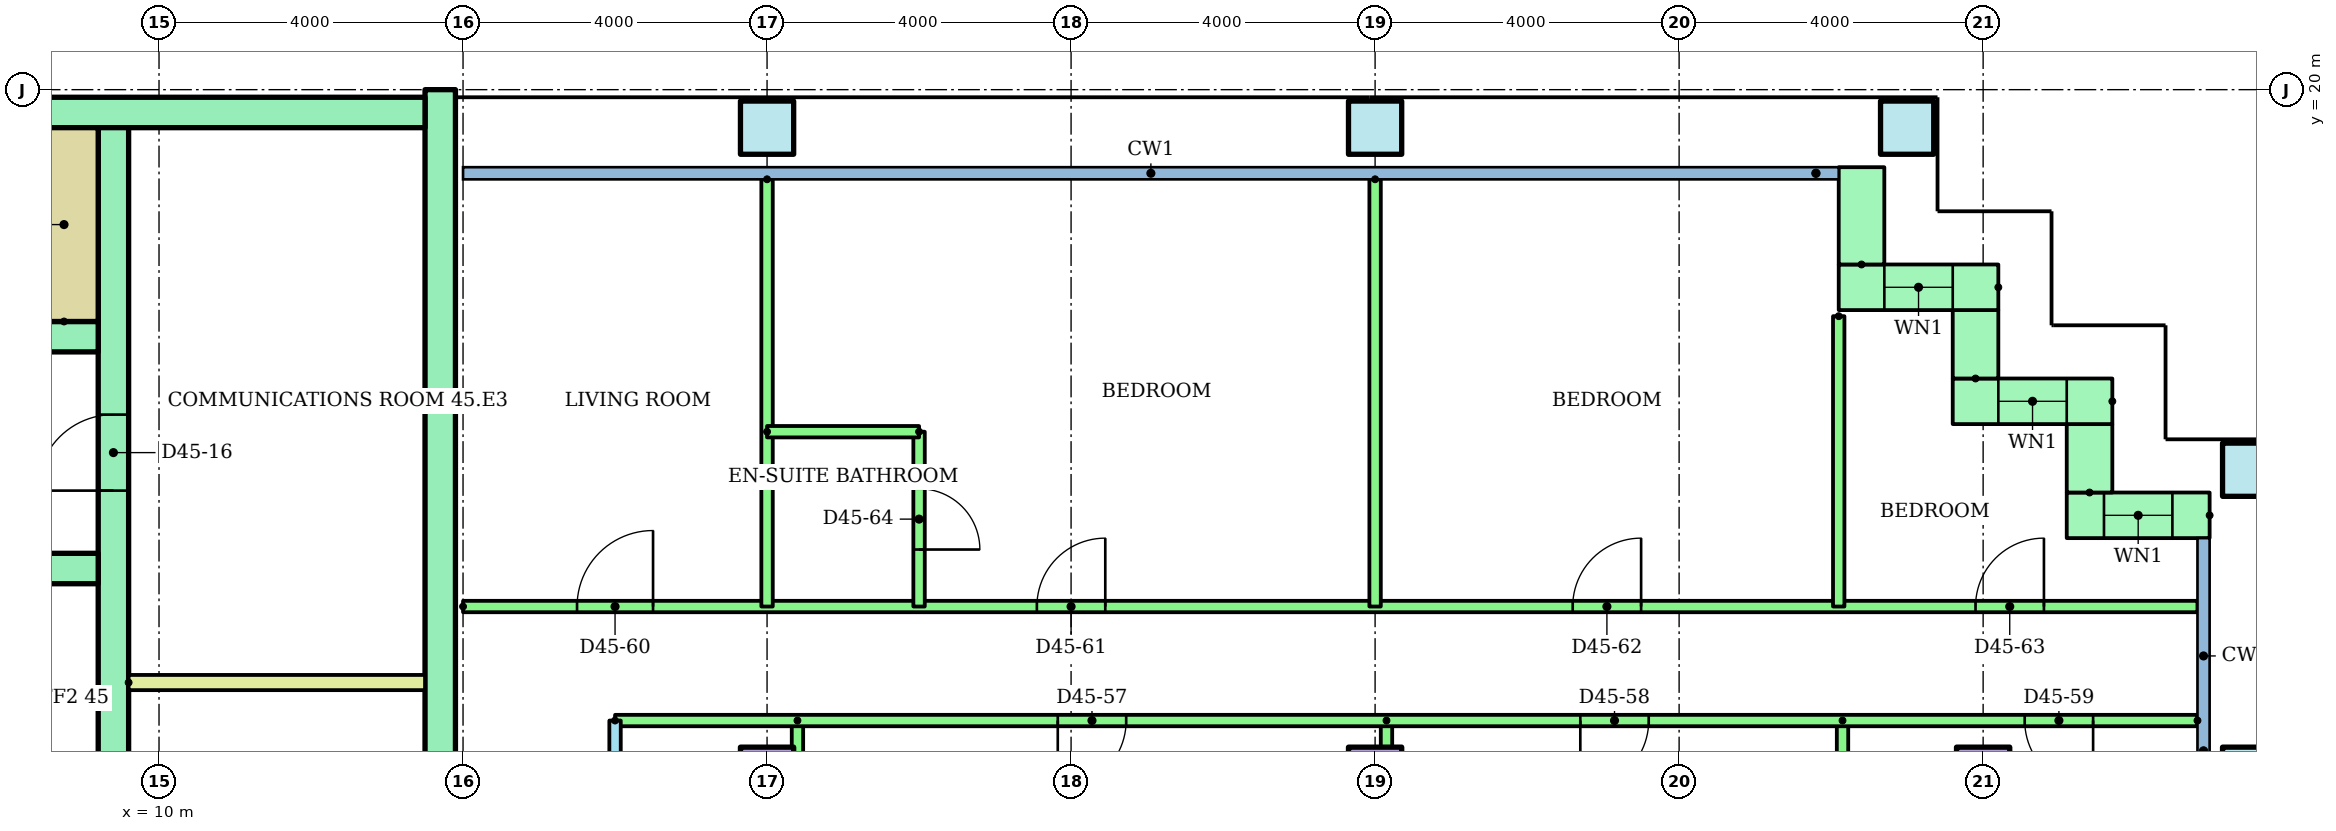
"""IFC4 building model, lengths in metres.
Left out: names, types, materials, properties, quantities, classifications, styles, units other than length and angle.
Written with IfcOpenShell. Run it as: python <this file> out.ifc"""

import sys

from ifc_helpers import new_model, si_unit, direction, frame, frame_2d, origin, origin_2d, place, context, subcontext, project, spatial, rectangle, hollow_rectangle, extrude, element, fill, save


model = new_model("IFC4")
c1 = context("Model", 3, precision=1e-05, world=origin(), true_north=direction((0.0, 1.0)))
c2 = subcontext(c1, "Body", "Model", "MODEL_VIEW")
j1 = project(units=[si_unit("LENGTHUNIT", "METRE"), si_unit("PLANEANGLEUNIT", "RADIAN")], contexts=[c1])
p1 = place(None, origin())
s1 = spatial("IfcSite", under=j1, at=p1, CompositionType="ELEMENT")
p2 = place(p1, origin())
s2 = spatial("IfcBuilding", under=s1, at=p2, CompositionType="ELEMENT")
p3 = place(p2, frame((0.0, 0.0, 174.9)))
s3 = spatial("IfcBuildingStorey", under=s2, at=p3, CompositionType="ELEMENT", Elevation=174.9)
for number, where in (
    (1, (18.0, 11.0, 0.0)),
    (2, (26.0, 11.0, 0.0)),
    (3, (34.0, 11.0, 0.0)),
):
    element("IfcColumn", number, at=place(p3, frame(where)), inside=s3, PredefinedType="COLUMN", context=c2, shape_type="SweptSolid", body=[
        extrude(rectangle(XDim=0.7, YDim=0.7, at=origin_2d()), origin(), (0.0, 0.0, 1.0), 3.2),
    ])
for number, where in (
    (4, (37.5, 11.0, 0.0)),
    (5, (37.5, 15.0, 0.0)),
    (6, (18.0, 19.5, 0.0)),
    (7, (26.0, 19.5, 0.0)),
    (8, (33.0, 19.5, 0.0)),
):
    element("IfcColumn", number, at=place(p3, frame(where)), inside=s3, PredefinedType="COLUMN", context=c2, shape_type="SweptSolid", body=[
        extrude(hollow_rectangle(XDim=0.7, YDim=0.7, WallThickness=0.036, at=origin_2d()), origin(), (0.0, 0.0, 1.0), 3.2),
    ])
p4 = place(p3, frame((36.98, 14.4, 0.0), z_axis=(0.0, 0.0, 1.0), x_axis=(-1.0, 0.0, 0.0)))
e9 = element("IfcWall", 9, at=p4, inside=s3, PredefinedType="STANDARD", context=c2, shape_type="SweptSolid", body=[
    extrude(rectangle(XDim=1.88, YDim=0.6, at=frame_2d((0.94, 0.0))), origin(), (0.0, 0.0, 1.0), 2.92),
])
p5 = place(p4, frame((0.49, 0.0, 0.9)))
e10 = element("IfcOpeningElement", 10, at=p5, cuts=e9, PredefinedType="OPENING", context=c2, shape_type="SweptSolid", body=[
    extrude(rectangle(XDim=0.9, YDim=1.5, at=frame_2d((0.45, 0.75))), frame((0.0, 0.31, 0.0), z_axis=(0.0, -1.0, 0.0), x_axis=(1.0, 0.0, 0.0)), (0.0, 0.0, 1.0), 0.62),
])
p6 = place(p3, frame((35.4, 14.7, 0.0), z_axis=(0.0, 0.0, 1.0), x_axis=(0.0, 1.0, 0.0)))
e11 = element("IfcWall", 11, at=p6, inside=s3, PredefinedType="STANDARD", context=c2, shape_type="SweptSolid", body=[
    extrude(rectangle(XDim=0.9, YDim=0.6, at=frame_2d((0.45, 0.0))), origin(), (0.0, 0.0, 1.0), 2.92),
])
p7 = place(p3, frame((35.7, 15.9, 0.0), z_axis=(0.0, 0.0, 1.0), x_axis=(-1.0, 0.0, 0.0)))
e12 = element("IfcWall", 12, at=p7, inside=s3, PredefinedType="STANDARD", context=c2, shape_type="SweptSolid", body=[
    extrude(rectangle(XDim=2.1, YDim=0.6, at=frame_2d((1.05, 0.0))), origin(), (0.0, 0.0, 1.0), 2.92),
])
p8 = place(p7, frame((0.6, 0.0, 0.9)))
e13 = element("IfcOpeningElement", 13, at=p8, cuts=e12, PredefinedType="OPENING", context=c2, shape_type="SweptSolid", body=[
    extrude(rectangle(XDim=0.9, YDim=1.5, at=frame_2d((0.45, 0.75))), frame((0.0, 0.31, 0.0), z_axis=(0.0, -1.0, 0.0), x_axis=(1.0, 0.0, 0.0)), (0.0, 0.0, 1.0), 0.62),
])
p9 = place(p3, frame((33.9, 16.2, 0.0), z_axis=(0.0, 0.0, 1.0), x_axis=(0.0, 1.0, 0.0)))
e14 = element("IfcWall", 14, at=p9, inside=s3, PredefinedType="STANDARD", context=c2, shape_type="SweptSolid", body=[
    extrude(rectangle(XDim=0.9, YDim=0.6, at=frame_2d((0.45, 0.0))), origin(), (0.0, 0.0, 1.0), 2.92),
])
p10 = place(p3, frame((34.2, 17.4, 0.0), z_axis=(0.0, 0.0, 1.0), x_axis=(-1.0, 0.0, 0.0)))
e15 = element("IfcWall", 15, at=p10, inside=s3, PredefinedType="STANDARD", context=c2, shape_type="SweptSolid", body=[
    extrude(rectangle(XDim=2.1, YDim=0.6, at=frame_2d((1.05, 0.0))), origin(), (0.0, 0.0, 1.0), 2.92),
])
p11 = place(p10, frame((0.6, 0.0, 0.9)))
e16 = element("IfcOpeningElement", 16, at=p11, cuts=e15, PredefinedType="OPENING", context=c2, shape_type="SweptSolid", body=[
    extrude(rectangle(XDim=0.9, YDim=1.5, at=frame_2d((0.45, 0.75))), frame((0.0, 0.31, 0.0), z_axis=(0.0, -1.0, 0.0), x_axis=(1.0, 0.0, 0.0)), (0.0, 0.0, 1.0), 0.62),
])
p12 = place(p3, frame((32.4, 17.7, 0.0), z_axis=(0.0, 0.0, 1.0), x_axis=(0.0, 1.0, 0.0)))
e17 = element("IfcWall", 17, at=p12, inside=s3, PredefinedType="STANDARD", context=c2, shape_type="SweptSolid", body=[
    extrude(rectangle(XDim=1.28, YDim=0.6, at=frame_2d((0.64, 0.0))), origin(), (0.0, 0.0, 1.0), 2.92),
])
p13 = place(p3, frame((13.7, 3.0, 0.0), z_axis=(0.0, 0.0, 1.0), x_axis=(0.0, 1.0, 0.0)))
e18 = element("IfcWall", 18, at=p13, inside=s3, PredefinedType="SHEAR", context=c2, shape_type="SweptSolid", body=[
    extrude(rectangle(XDim=17.0, YDim=0.4, at=frame_2d((8.5, 0.0))), origin(), (0.0, 0.0, 1.0), 2.92),
])
p14 = place(p3, frame((-13.5, 19.7, 0.0)))
e19 = element("IfcWall", 19, at=p14, inside=s3, PredefinedType="SHEAR", context=c2, shape_type="SweptSolid", body=[
    extrude(rectangle(XDim=27.0, YDim=0.4, at=frame_2d((13.5, 0.0))), origin(), (0.0, 0.0, 1.0), 2.92),
])
p15 = place(p3, frame((9.4, 6.8, 0.0), z_axis=(0.0, 0.0, 1.0), x_axis=(0.0, 1.0, 0.0)))
e20 = element("IfcWall", 20, at=p15, inside=s3, PredefinedType="SHEAR", context=c2, shape_type="SweptSolid", body=[
    extrude(rectangle(XDim=12.7, YDim=0.4, at=frame_2d((6.35, 0.0))), origin(), (0.0, 0.0, 1.0), 2.92),
])
p16 = place(p15, frame((0.3, 0.0, 0.0)))
e21 = element("IfcOpeningElement", 21, at=p16, cuts=e20, PredefinedType="OPENING", context=c2, shape_type="SweptSolid", body=[
    extrude(rectangle(XDim=1.0, YDim=2.1, at=frame_2d((0.5, 1.05))), frame((0.0, 0.21, 0.0), z_axis=(0.0, -1.0, 0.0), x_axis=(1.0, 0.0, 0.0)), (0.0, 0.0, 1.0), 0.42),
])
p17 = place(p15, frame((2.05, 0.0, 0.0)))
e22 = element("IfcOpeningElement", 22, at=p17, cuts=e20, PredefinedType="OPENING", context=c2, shape_type="SweptSolid", body=[
    extrude(rectangle(XDim=1.0, YDim=2.1, at=frame_2d((0.5, 1.05))), frame((0.0, 0.21, 0.0), z_axis=(0.0, -1.0, 0.0), x_axis=(1.0, 0.0, 0.0)), (0.0, 0.0, 1.0), 0.42),
])
p18 = place(p15, frame((7.925, 0.0, 0.0)))
e23 = element("IfcOpeningElement", 23, at=p18, cuts=e20, PredefinedType="OPENING", context=c2, shape_type="SweptSolid", body=[
    extrude(rectangle(XDim=1.0, YDim=2.1, at=frame_2d((0.5, 1.05))), frame((0.0, 0.21, 0.0), z_axis=(0.0, -1.0, 0.0), x_axis=(1.0, 0.0, 0.0)), (0.0, 0.0, 1.0), 0.42),
])
p19 = place(p3, frame((1.2, 13.7, 0.0)))
e24 = element("IfcWall", 24, at=p19, inside=s3, PredefinedType="SHEAR", context=c2, shape_type="SweptSolid", body=[
    extrude(rectangle(XDim=8.0, YDim=0.4, at=frame_2d((4.0, 0.0))), origin(), (0.0, 0.0, 1.0), 2.92),
])
p20 = place(p3, frame((-9.2, 16.75, 0.0)))
e25 = element("IfcWall", 25, at=p20, inside=s3, PredefinedType="SHEAR", context=c2, shape_type="SweptSolid", body=[
    extrude(rectangle(XDim=18.4, YDim=0.4, at=frame_2d((9.2, 0.0))), origin(), (0.0, 0.0, 1.0), 2.92),
])
p21 = place(p20, frame((0.1, 0.0, 0.0)))
e26 = element("IfcOpeningElement", 26, at=p21, cuts=e25, PredefinedType="OPENING", context=c2, shape_type="SweptSolid", body=[
    extrude(rectangle(XDim=0.95, YDim=2.1, at=frame_2d((0.475, 1.05))), frame((0.0, 0.21, 0.0), z_axis=(0.0, -1.0, 0.0), x_axis=(1.0, 0.0, 0.0)), (0.0, 0.0, 1.0), 0.42),
])
p22 = place(p20, frame((6.1, 0.0, 0.0)))
e27 = element("IfcOpeningElement", 27, at=p22, cuts=e25, PredefinedType="OPENING", context=c2, shape_type="SweptSolid", body=[
    extrude(rectangle(XDim=0.95, YDim=2.1, at=frame_2d((0.475, 1.05))), frame((0.0, 0.21, 0.0), z_axis=(0.0, -1.0, 0.0), x_axis=(1.0, 0.0, 0.0)), (0.0, 0.0, 1.0), 0.42),
])
p23 = place(p20, frame((12.1, 0.0, 0.0)))
e28 = element("IfcOpeningElement", 28, at=p23, cuts=e25, PredefinedType="OPENING", context=c2, shape_type="SweptSolid", body=[
    extrude(rectangle(XDim=0.95, YDim=2.1, at=frame_2d((0.475, 1.05))), frame((0.0, 0.21, 0.0), z_axis=(0.0, -1.0, 0.0), x_axis=(1.0, 0.0, 0.0)), (0.0, 0.0, 1.0), 0.42),
])
p24 = place(p3, frame((8.75, 16.95, 0.0), z_axis=(0.0, 0.0, 1.0), x_axis=(0.0, 1.0, 0.0)))
e29 = element("IfcWall", 29, at=p24, inside=s3, PredefinedType="SHEAR", context=c2, shape_type="SweptSolid", body=[
    extrude(rectangle(XDim=2.55, YDim=0.9, at=frame_2d((1.275, 0.0))), origin(), (0.0, 0.0, 1.0), 2.92),
])
p25 = place(p3, frame((9.6, 12.2, 0.0)))
e30 = element("IfcWall", 30, at=p25, inside=s3, PredefinedType="PARTITIONING", context=c2, shape_type="SweptSolid", body=[
    extrude(rectangle(XDim=3.9, YDim=0.2, at=frame_2d((1.95, 0.0))), origin(), (0.0, 0.0, 1.0), 2.92),
])
p26 = place(p3, frame((16.0, 11.7, 0.0), z_axis=(0.0, 0.0, 1.0), x_axis=(0.0, -1.0, 0.0)))
e31 = element("IfcWall", 31, at=p26, inside=s3, PredefinedType="PARTITIONING", context=c2, shape_type="SweptSolid", body=[
    extrude(rectangle(XDim=10.3, YDim=0.15, at=frame_2d((5.15, 0.0))), origin(), (0.0, 0.0, 1.0), 2.4),
])
p27 = place(p26, frame((6.975, 0.0, 0.0)))
e32 = element("IfcOpeningElement", 32, at=p27, cuts=e31, PredefinedType="OPENING", context=c2, shape_type="SweptSolid", body=[
    extrude(rectangle(XDim=0.9, YDim=2.1, at=frame_2d((0.45, 1.05))), frame((0.0, 0.085, 0.0), z_axis=(0.0, -1.0, 0.0), x_axis=(1.0, 0.0, 0.0)), (0.0, 0.0, 1.0), 0.17),
])
p28 = place(p26, frame((1.875, 0.0, 0.0)))
e33 = element("IfcOpeningElement", 33, at=p28, cuts=e31, PredefinedType="OPENING", context=c2, shape_type="SweptSolid", body=[
    extrude(rectangle(XDim=0.8, YDim=2.1, at=frame_2d((0.4, 1.05))), frame((0.0, 0.085, 0.0), z_axis=(0.0, -1.0, 0.0), x_axis=(1.0, 0.0, 0.0)), (0.0, 0.0, 1.0), 0.17),
])
for number, where, z_axis, x_axis in (
    (34, (18.4, 11.7, 0.0), (0.0, 0.0, 1.0), (0.0, -1.0, 0.0)),
    (35, (26.15, 11.7, 0.0), (0.0, 0.0, 1.0), (0.0, -1.0, 0.0)),
    (36, (32.15, 11.7, 0.0), (0.0, 0.0, 1.0), (0.0, -1.0, 0.0)),
):
    element("IfcWall", number, at=place(p3, frame(where, z_axis=z_axis, x_axis=x_axis)), inside=s3, PredefinedType="PARTITIONING", context=c2, shape_type="SweptSolid", body=[
        extrude(rectangle(XDim=10.3, YDim=0.15, at=frame_2d((5.15, 0.0))), origin(), (0.0, 0.0, 1.0), 2.4),
    ])
p29 = place(p3, frame((36.82, 11.7, 0.0), z_axis=(0.0, 0.0, 1.0), x_axis=(-1.0, 0.0, 0.0)))
e37 = element("IfcWall", 37, at=p29, inside=s3, PredefinedType="PARTITIONING", context=c2, shape_type="SweptSolid", body=[
    extrude(rectangle(XDim=20.82, YDim=0.15, at=frame_2d((10.41, 0.0))), origin(), (0.0, 0.0, 1.0), 2.4),
])
p30 = place(p29, frame((14.095, 0.0, 0.0)))
e38 = element("IfcOpeningElement", 38, at=p30, cuts=e37, PredefinedType="OPENING", context=c2, shape_type="SweptSolid", body=[
    extrude(rectangle(XDim=0.9, YDim=2.1, at=frame_2d((0.45, 1.05))), frame((0.0, 0.085, 0.0), z_axis=(0.0, -1.0, 0.0), x_axis=(1.0, 0.0, 0.0)), (0.0, 0.0, 1.0), 0.17),
])
p31 = place(p29, frame((7.22, 0.0, 0.0)))
e39 = element("IfcOpeningElement", 39, at=p31, cuts=e37, PredefinedType="OPENING", context=c2, shape_type="SweptSolid", body=[
    extrude(rectangle(XDim=0.9, YDim=2.1, at=frame_2d((0.45, 1.05))), frame((0.0, 0.085, 0.0), z_axis=(0.0, -1.0, 0.0), x_axis=(1.0, 0.0, 0.0)), (0.0, 0.0, 1.0), 0.17),
])
p32 = place(p29, frame((1.373, 0.0, 0.0)))
e40 = element("IfcOpeningElement", 40, at=p32, cuts=e37, PredefinedType="OPENING", context=c2, shape_type="SweptSolid", body=[
    extrude(rectangle(XDim=0.9, YDim=2.1, at=frame_2d((0.45, 1.05))), frame((0.0, 0.085, 0.0), z_axis=(0.0, -1.0, 0.0), x_axis=(1.0, 0.0, 0.0)), (0.0, 0.0, 1.0), 0.17),
])
p33 = place(p3, frame((14.0, 13.2, 0.0)))
e41 = element("IfcWall", 41, at=p33, inside=s3, PredefinedType="PARTITIONING", context=c2, shape_type="SweptSolid", body=[
    extrude(rectangle(XDim=22.82, YDim=0.15, at=frame_2d((11.41, 0.0))), origin(), (0.0, 0.0, 1.0), 2.4),
])
p34 = place(p33, frame((1.5, 0.0, 0.0)))
e42 = element("IfcOpeningElement", 42, at=p34, cuts=e41, PredefinedType="OPENING", context=c2, shape_type="SweptSolid", body=[
    extrude(rectangle(XDim=1.0, YDim=2.1, at=frame_2d((0.5, 1.05))), frame((0.0, 0.085, 0.0), z_axis=(0.0, -1.0, 0.0), x_axis=(1.0, 0.0, 0.0)), (0.0, 0.0, 1.0), 0.17),
])
p35 = place(p33, frame((7.55, 0.0, 0.0)))
e43 = element("IfcOpeningElement", 43, at=p35, cuts=e41, PredefinedType="OPENING", context=c2, shape_type="SweptSolid", body=[
    extrude(rectangle(XDim=0.9, YDim=2.1, at=frame_2d((0.45, 1.05))), frame((0.0, 0.085, 0.0), z_axis=(0.0, -1.0, 0.0), x_axis=(1.0, 0.0, 0.0)), (0.0, 0.0, 1.0), 0.17),
])
p36 = place(p33, frame((14.6, 0.0, 0.0)))
e44 = element("IfcOpeningElement", 44, at=p36, cuts=e41, PredefinedType="OPENING", context=c2, shape_type="SweptSolid", body=[
    extrude(rectangle(XDim=0.9, YDim=2.1, at=frame_2d((0.45, 1.05))), frame((0.0, 0.085, 0.0), z_axis=(0.0, -1.0, 0.0), x_axis=(1.0, 0.0, 0.0)), (0.0, 0.0, 1.0), 0.17),
])
p37 = place(p33, frame((19.9, 0.0, 0.0)))
e45 = element("IfcOpeningElement", 45, at=p37, cuts=e41, PredefinedType="OPENING", context=c2, shape_type="SweptSolid", body=[
    extrude(rectangle(XDim=0.9, YDim=2.1, at=frame_2d((0.45, 1.05))), frame((0.0, 0.085, 0.0), z_axis=(0.0, -1.0, 0.0), x_axis=(1.0, 0.0, 0.0)), (0.0, 0.0, 1.0), 0.17),
])
for number, where, z_axis, x_axis in (
    (46, (18.0, 18.821, 0.0), (0.0, 0.0, 1.0), (0.0, -1.0, 0.0)),
    (47, (26.0, 18.821, 0.0), (0.0, 0.0, 1.0), (0.0, -1.0, 0.0)),
):
    element("IfcWall", number, at=place(p3, frame(where, z_axis=z_axis, x_axis=x_axis)), inside=s3, PredefinedType="PARTITIONING", context=c2, shape_type="SweptSolid", body=[
        extrude(rectangle(XDim=5.621, YDim=0.15, at=frame_2d((2.811, 0.0))), origin(), (0.0, 0.0, 1.0), 2.4),
    ])
p38 = place(p3, frame((32.1, 17.02, 0.0), z_axis=(0.0, 0.0, 1.0), x_axis=(0.0, -1.0, 0.0)))
e48 = element("IfcWall", 48, at=p38, inside=s3, PredefinedType="PARTITIONING", context=c2, shape_type="SweptSolid", body=[
    extrude(rectangle(XDim=3.82, YDim=0.15, at=frame_2d((1.91, 0.0))), origin(), (0.0, 0.0, 1.0), 2.4),
])
p39 = place(p3, frame((20.0, 15.5, 0.0), z_axis=(0.0, 0.0, 1.0), x_axis=(0.0, -1.0, 0.0)))
e49 = element("IfcWall", 49, at=p39, inside=s3, PredefinedType="PARTITIONING", context=c2, shape_type="SweptSolid", body=[
    extrude(rectangle(XDim=2.3, YDim=0.15, at=frame_2d((1.15, 0.0))), origin(), (0.0, 0.0, 1.0), 2.4),
])
p40 = place(p39, frame((0.75, 0.0, 0.0)))
e50 = element("IfcOpeningElement", 50, at=p40, cuts=e49, PredefinedType="OPENING", context=c2, shape_type="SweptSolid", body=[
    extrude(rectangle(XDim=0.8, YDim=2.1, at=frame_2d((0.4, 1.05))), frame((0.0, 0.085, 0.0), z_axis=(0.0, -1.0, 0.0), x_axis=(1.0, 0.0, 0.0)), (0.0, 0.0, 1.0), 0.17),
])
p41 = place(p3, frame((18.0, 15.5, 0.0)))
e51 = element("IfcWall", 51, at=p41, inside=s3, PredefinedType="PARTITIONING", context=c2, shape_type="SweptSolid", body=[
    extrude(rectangle(XDim=2.0, YDim=0.15, at=frame_2d((1.0, 0.0))), origin(), (0.0, 0.0, 1.0), 2.4),
])
p42 = place(p5, origin())
e52 = element("IfcWindow", 52, at=p42, inside=s3, PartitioningType="SINGLE_PANEL", PredefinedType="WINDOW", context=c2, shape_type="SweptSolid", body=[
    extrude(rectangle(XDim=0.9, YDim=1.5, at=frame_2d((0.45, 0.75))), frame((0.0, 0.03, 0.0), z_axis=(0.0, -1.0, 0.0), x_axis=(1.0, 0.0, 0.0)), (0.0, 0.0, 1.0), 0.06),
])
fill(e10, e52)
p43 = place(p8, origin())
e53 = element("IfcWindow", 53, at=p43, inside=s3, PartitioningType="SINGLE_PANEL", PredefinedType="WINDOW", context=c2, shape_type="SweptSolid", body=[
    extrude(rectangle(XDim=0.9, YDim=1.5, at=frame_2d((0.45, 0.75))), frame((0.0, 0.03, 0.0), z_axis=(0.0, -1.0, 0.0), x_axis=(1.0, 0.0, 0.0)), (0.0, 0.0, 1.0), 0.06),
])
fill(e13, e53)
p44 = place(p11, origin())
e54 = element("IfcWindow", 54, at=p44, inside=s3, PartitioningType="SINGLE_PANEL", PredefinedType="WINDOW", context=c2, shape_type="SweptSolid", body=[
    extrude(rectangle(XDim=0.9, YDim=1.5, at=frame_2d((0.45, 0.75))), frame((0.0, 0.03, 0.0), z_axis=(0.0, -1.0, 0.0), x_axis=(1.0, 0.0, 0.0)), (0.0, 0.0, 1.0), 0.06),
])
fill(e16, e54)
p45 = place(p18, origin())
e55 = element("IfcDoor", 55, at=p45, inside=s3, OperationType="SINGLE_SWING_LEFT", PredefinedType="DOOR", context=c2, shape_type="SweptSolid", body=[
    extrude(rectangle(XDim=1.0, YDim=2.1, at=frame_2d((0.5, 1.05))), frame((0.0, 0.025, 0.0), z_axis=(0.0, -1.0, 0.0), x_axis=(1.0, 0.0, 0.0)), (0.0, 0.0, 1.0), 0.05),
])
fill(e23, e55)
p46 = place(p30, origin())
e56 = element("IfcDoor", 56, at=p46, inside=s3, OperationType="SINGLE_SWING_RIGHT", PredefinedType="DOOR", context=c2, shape_type="SweptSolid", body=[
    extrude(rectangle(XDim=0.9, YDim=2.1, at=frame_2d((0.45, 1.05))), frame((0.0, 0.025, 0.0), z_axis=(0.0, -1.0, 0.0), x_axis=(1.0, 0.0, 0.0)), (0.0, 0.0, 1.0), 0.05),
])
fill(e38, e56)
p47 = place(p31, origin())
e57 = element("IfcDoor", 57, at=p47, inside=s3, OperationType="SINGLE_SWING_RIGHT", PredefinedType="DOOR", context=c2, shape_type="SweptSolid", body=[
    extrude(rectangle(XDim=0.9, YDim=2.1, at=frame_2d((0.45, 1.05))), frame((0.0, 0.025, 0.0), z_axis=(0.0, -1.0, 0.0), x_axis=(1.0, 0.0, 0.0)), (0.0, 0.0, 1.0), 0.05),
])
fill(e39, e57)
p48 = place(p32, origin())
e58 = element("IfcDoor", 58, at=p48, inside=s3, OperationType="SINGLE_SWING_LEFT", PredefinedType="DOOR", context=c2, shape_type="SweptSolid", body=[
    extrude(rectangle(XDim=0.9, YDim=2.1, at=frame_2d((0.45, 1.05))), frame((0.0, 0.025, 0.0), z_axis=(0.0, -1.0, 0.0), x_axis=(1.0, 0.0, 0.0)), (0.0, 0.0, 1.0), 0.05),
])
fill(e40, e58)
p49 = place(p34, origin())
e59 = element("IfcDoor", 59, at=p49, inside=s3, OperationType="SINGLE_SWING_RIGHT", PredefinedType="DOOR", context=c2, shape_type="SweptSolid", body=[
    extrude(rectangle(XDim=1.0, YDim=2.1, at=frame_2d((0.5, 1.05))), frame((0.0, 0.025, 0.0), z_axis=(0.0, -1.0, 0.0), x_axis=(1.0, 0.0, 0.0)), (0.0, 0.0, 1.0), 0.05),
])
fill(e42, e59)
p50 = place(p35, origin())
e60 = element("IfcDoor", 60, at=p50, inside=s3, OperationType="SINGLE_SWING_RIGHT", PredefinedType="DOOR", context=c2, shape_type="SweptSolid", body=[
    extrude(rectangle(XDim=0.9, YDim=2.1, at=frame_2d((0.45, 1.05))), frame((0.0, 0.025, 0.0), z_axis=(0.0, -1.0, 0.0), x_axis=(1.0, 0.0, 0.0)), (0.0, 0.0, 1.0), 0.05),
])
fill(e43, e60)
p51 = place(p36, origin())
e61 = element("IfcDoor", 61, at=p51, inside=s3, OperationType="SINGLE_SWING_RIGHT", PredefinedType="DOOR", context=c2, shape_type="SweptSolid", body=[
    extrude(rectangle(XDim=0.9, YDim=2.1, at=frame_2d((0.45, 1.05))), frame((0.0, 0.025, 0.0), z_axis=(0.0, -1.0, 0.0), x_axis=(1.0, 0.0, 0.0)), (0.0, 0.0, 1.0), 0.05),
])
fill(e44, e61)
p52 = place(p37, origin())
e62 = element("IfcDoor", 62, at=p52, inside=s3, OperationType="SINGLE_SWING_RIGHT", PredefinedType="DOOR", context=c2, shape_type="SweptSolid", body=[
    extrude(rectangle(XDim=0.9, YDim=2.1, at=frame_2d((0.45, 1.05))), frame((0.0, 0.025, 0.0), z_axis=(0.0, -1.0, 0.0), x_axis=(1.0, 0.0, 0.0)), (0.0, 0.0, 1.0), 0.05),
])
fill(e45, e62)
p53 = place(p40, origin())
e63 = element("IfcDoor", 63, at=p53, inside=s3, OperationType="SINGLE_SWING_RIGHT", PredefinedType="DOOR", context=c2, shape_type="SweptSolid", body=[
    extrude(rectangle(XDim=0.8, YDim=2.1, at=frame_2d((0.4, 1.05))), frame((0.0, 0.025, 0.0), z_axis=(0.0, -1.0, 0.0), x_axis=(1.0, 0.0, 0.0)), (0.0, 0.0, 1.0), 0.05),
])
fill(e50, e63)
save(model, sys.argv[1])
